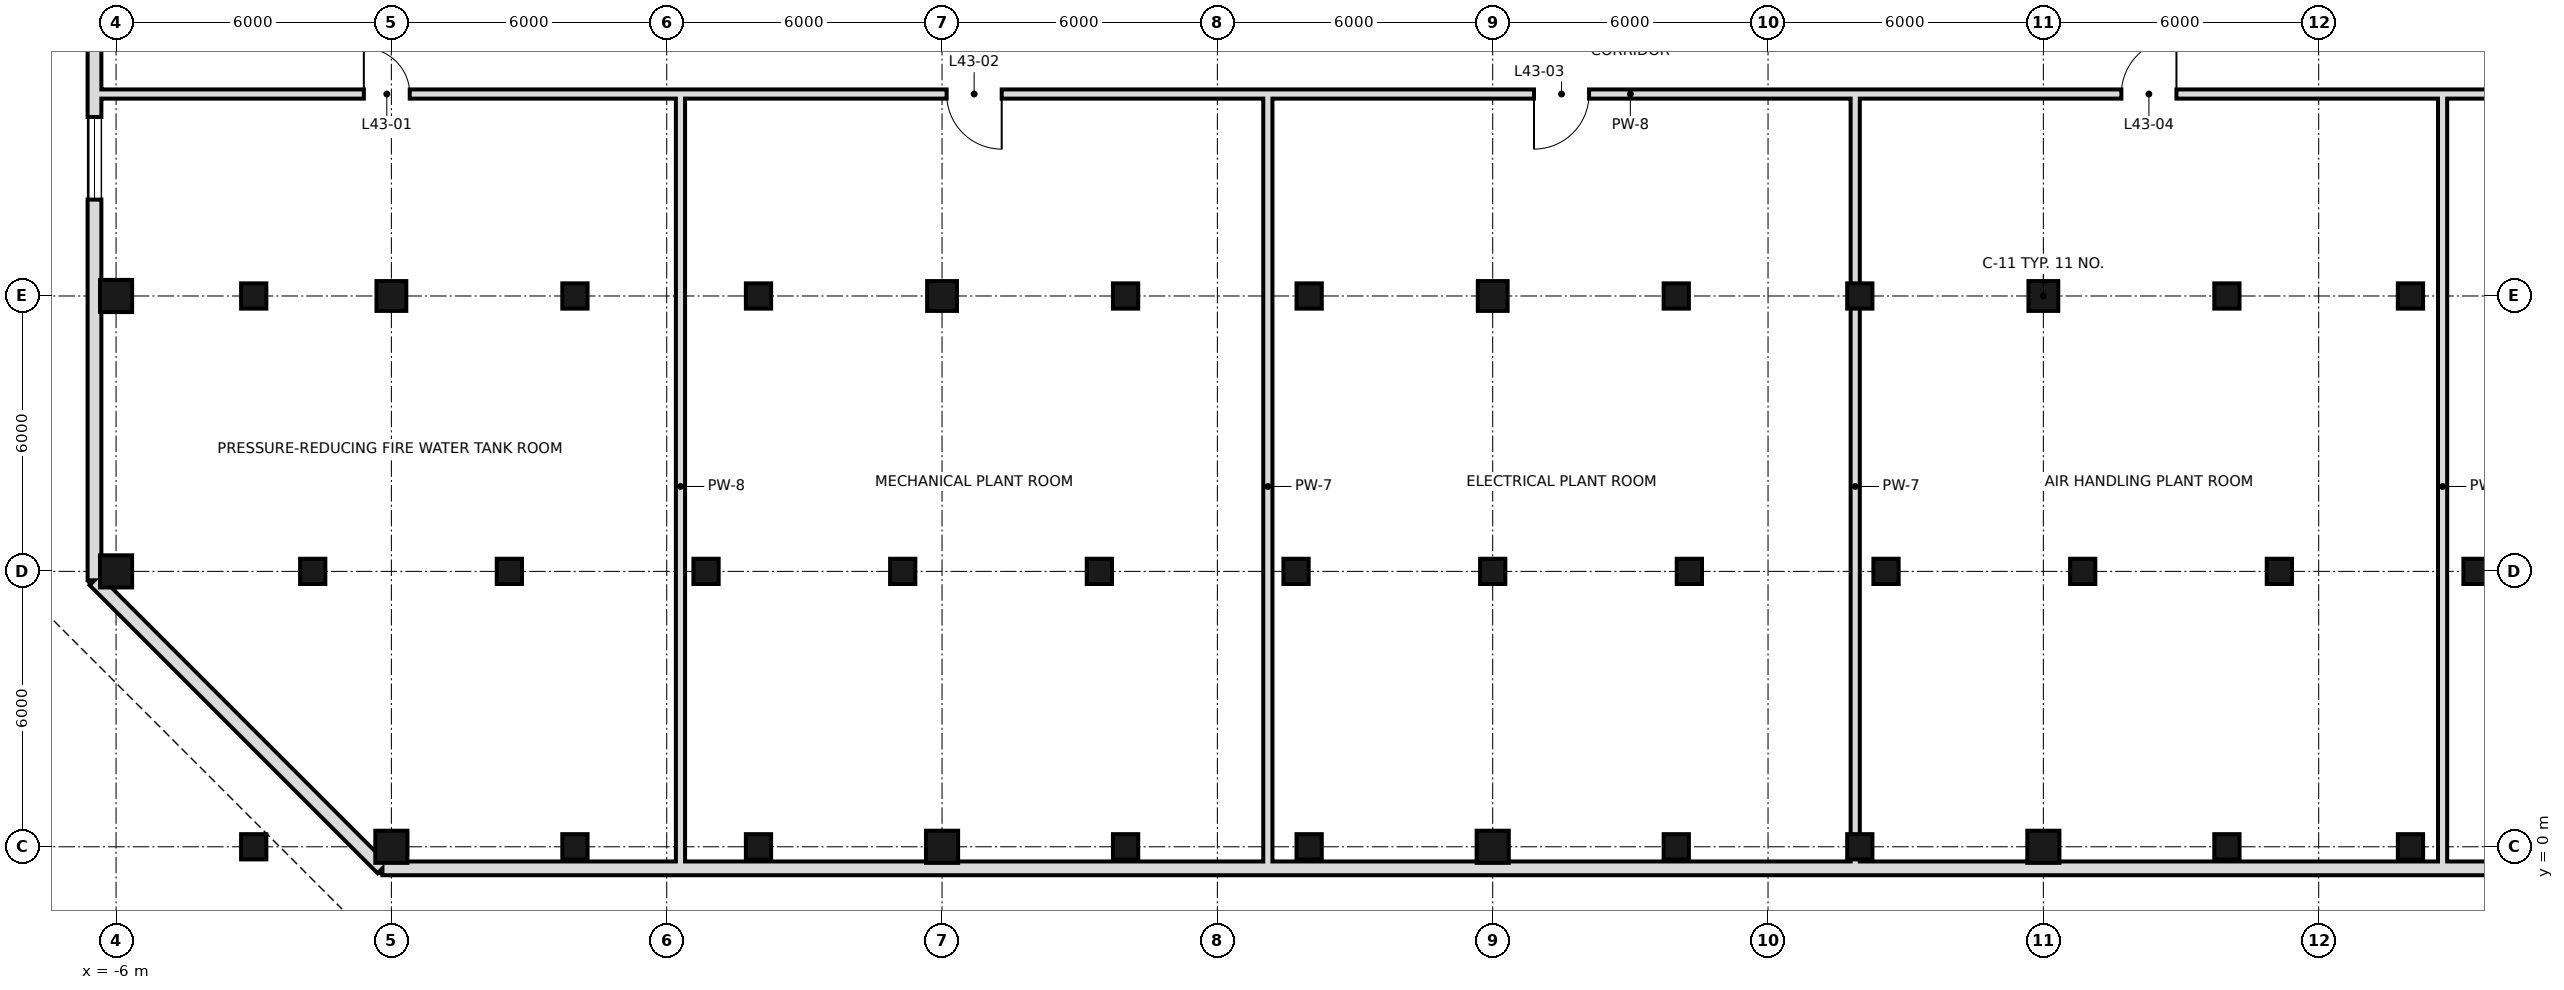
"""IFC4 building model, lengths in metres.
Left out: names, types, materials, properties, quantities, classifications, styles, units other than length and angle.
Written with IfcOpenShell. Run it as: python <this file> out.ifc"""

import sys

from ifc_helpers import new_model, si_unit, direction, frame, frame_2d, origin, origin_with_axes, origin_2d, place, context, subcontext, project, spatial, rectangle, hollow_rectangle, extrude, element, fill, save


model = new_model("IFC4")
c1 = context("Model", 3, precision=1e-05, world=origin(), true_north=direction((0.0, 1.0)))
c2 = subcontext(c1, "Body", "Model", "MODEL_VIEW")
j1 = project(units=[si_unit("LENGTHUNIT", "METRE"), si_unit("PLANEANGLEUNIT", "RADIAN")], contexts=[c1])
p1 = place(None, origin())
s1 = spatial("IfcSite", under=j1, at=p1, CompositionType="ELEMENT")
p2 = place(p1, origin())
s2 = spatial("IfcBuilding", under=s1, at=p2, CompositionType="ELEMENT")
p3 = place(p2, frame((0.0, 0.0, 186.0)))
s3 = spatial("IfcBuildingStorey", under=s2, at=p3, CompositionType="ELEMENT", Elevation=186.0)
p4 = place(p3, frame((-6.0, 6.0, 0.0), z_axis=(0.0, 0.0, 1.0), x_axis=(1.0, 0.0, 0.0)))
e1 = element("IfcColumn", 1, at=p4, inside=s3, PredefinedType="COLUMN", context=c2, shape_type="SweptSolid", body=[
    extrude(hollow_rectangle(XDim=0.7, YDim=0.7, WallThickness=0.036, at=origin_2d()), origin(), (0.0, 0.0, 1.0), 6.0),
])
p5 = place(p3, frame((-6.0, 12.0, 0.0), z_axis=(0.0, 0.0, 1.0), x_axis=(1.0, 0.0, 0.0)))
e2 = element("IfcColumn", 2, at=p5, inside=s3, PredefinedType="COLUMN", context=c2, shape_type="SweptSolid", body=[
    extrude(hollow_rectangle(XDim=0.7, YDim=0.7, WallThickness=0.036, at=origin_2d()), origin(), (0.0, 0.0, 1.0), 5.7),
])
p6 = place(p3, origin_with_axes())
e3 = element("IfcColumn", 3, at=p6, inside=s3, PredefinedType="COLUMN", context=c2, shape_type="SweptSolid", body=[
    extrude(hollow_rectangle(XDim=0.7, YDim=0.7, WallThickness=0.036, at=origin_2d()), origin(), (0.0, 0.0, 1.0), 6.0),
])
p7 = place(p3, frame((0.0, 12.0, 0.0), z_axis=(0.0, 0.0, 1.0), x_axis=(1.0, 0.0, 0.0)))
e4 = element("IfcColumn", 4, at=p7, inside=s3, PredefinedType="COLUMN", context=c2, shape_type="SweptSolid", body=[
    extrude(hollow_rectangle(XDim=0.65, YDim=0.65, WallThickness=0.032, at=origin_2d()), origin(), (0.0, 0.0, 1.0), 6.0),
])
p8 = place(p3, frame((12.0, 0.0, 0.0), z_axis=(0.0, 0.0, 1.0), x_axis=(1.0, 0.0, 0.0)))
e5 = element("IfcColumn", 5, at=p8, inside=s3, PredefinedType="COLUMN", context=c2, shape_type="SweptSolid", body=[
    extrude(hollow_rectangle(XDim=0.7, YDim=0.7, WallThickness=0.036, at=origin_2d()), origin(), (0.0, 0.0, 1.0), 6.0),
])
p9 = place(p3, frame((12.0, 12.0, 0.0), z_axis=(0.0, 0.0, 1.0), x_axis=(1.0, 0.0, 0.0)))
e6 = element("IfcColumn", 6, at=p9, inside=s3, PredefinedType="COLUMN", context=c2, shape_type="SweptSolid", body=[
    extrude(hollow_rectangle(XDim=0.65, YDim=0.65, WallThickness=0.032, at=origin_2d()), origin(), (0.0, 0.0, 1.0), 6.0),
])
p10 = place(p3, frame((24.0, 0.0, 0.0), z_axis=(0.0, 0.0, 1.0), x_axis=(1.0, 0.0, 0.0)))
e7 = element("IfcColumn", 7, at=p10, inside=s3, PredefinedType="COLUMN", context=c2, shape_type="SweptSolid", body=[
    extrude(hollow_rectangle(XDim=0.7, YDim=0.7, WallThickness=0.036, at=origin_2d()), origin(), (0.0, 0.0, 1.0), 6.0),
])
p11 = place(p3, frame((24.0, 12.0, 0.0), z_axis=(0.0, 0.0, 1.0), x_axis=(1.0, 0.0, 0.0)))
e8 = element("IfcColumn", 8, at=p11, inside=s3, PredefinedType="COLUMN", context=c2, shape_type="SweptSolid", body=[
    extrude(hollow_rectangle(XDim=0.65, YDim=0.65, WallThickness=0.032, at=origin_2d()), origin(), (0.0, 0.0, 1.0), 6.0),
])
p12 = place(p3, frame((36.0, 0.0, 0.0), z_axis=(0.0, 0.0, 1.0), x_axis=(1.0, 0.0, 0.0)))
e9 = element("IfcColumn", 9, at=p12, inside=s3, PredefinedType="COLUMN", context=c2, shape_type="SweptSolid", body=[
    extrude(hollow_rectangle(XDim=0.7, YDim=0.7, WallThickness=0.036, at=origin_2d()), origin(), (0.0, 0.0, 1.0), 6.0),
])
p13 = place(p3, frame((36.0, 12.0, 0.0), z_axis=(0.0, 0.0, 1.0), x_axis=(1.0, 0.0, 0.0)))
e10 = element("IfcColumn", 10, at=p13, inside=s3, PredefinedType="COLUMN", context=c2, shape_type="SweptSolid", body=[
    extrude(hollow_rectangle(XDim=0.65, YDim=0.65, WallThickness=0.032, at=origin_2d()), origin(), (0.0, 0.0, 1.0), 6.0),
])
for number, where, z_axis, x_axis in (
    (11, (-3.0, 0.0, 1.1), (0.0, 0.0, 1.0), (1.0, 0.0, 0.0)),
    (12, (4.0, 0.0, 1.1), (0.0, 0.0, 1.0), (1.0, 0.0, 0.0)),
    (13, (8.0, 0.0, 1.1), (0.0, 0.0, 1.0), (1.0, 0.0, 0.0)),
    (14, (16.0, 0.0, 1.1), (0.0, 0.0, 1.0), (1.0, 0.0, 0.0)),
    (15, (20.0, 0.0, 1.1), (0.0, 0.0, 1.0), (1.0, 0.0, 0.0)),
    (16, (28.0, 0.0, 1.1), (0.0, 0.0, 1.0), (1.0, 0.0, 0.0)),
    (17, (32.0, 0.0, 1.1), (0.0, 0.0, 1.0), (1.0, 0.0, 0.0)),
    (18, (40.0, 0.0, 1.1), (0.0, 0.0, 1.0), (1.0, 0.0, 0.0)),
    (19, (44.0, 0.0, 1.1), (0.0, 0.0, 1.0), (1.0, 0.0, 0.0)),
    (20, (-1.714, 6.0, 1.1), (0.0, 0.0, 1.0), (1.0, 0.0, 0.0)),
    (21, (2.572, 6.0, 1.1), (0.0, 0.0, 1.0), (1.0, 0.0, 0.0)),
    (22, (6.857, 6.0, 1.1), (0.0, 0.0, 1.0), (1.0, 0.0, 0.0)),
    (23, (11.143, 6.0, 1.1), (0.0, 0.0, 1.0), (1.0, 0.0, 0.0)),
    (24, (15.428, 6.0, 1.1), (0.0, 0.0, 1.0), (1.0, 0.0, 0.0)),
    (25, (19.714, 6.0, 1.1), (0.0, 0.0, 1.0), (1.0, 0.0, 0.0)),
    (26, (24.0, 6.0, 1.1), (0.0, 0.0, 1.0), (1.0, 0.0, 0.0)),
    (27, (28.286, 6.0, 1.1), (0.0, 0.0, 1.0), (1.0, 0.0, 0.0)),
    (28, (32.572, 6.0, 1.1), (0.0, 0.0, 1.0), (1.0, 0.0, 0.0)),
    (29, (36.857, 6.0, 1.1), (0.0, 0.0, 1.0), (1.0, 0.0, 0.0)),
    (30, (41.143, 6.0, 1.1), (0.0, 0.0, 1.0), (1.0, 0.0, 0.0)),
    (31, (45.428, 6.0, 1.1), (0.0, 0.0, 1.0), (1.0, 0.0, 0.0)),
    (32, (-3.0, 12.0, 1.1), (0.0, 0.0, 1.0), (1.0, 0.0, 0.0)),
    (33, (4.0, 12.0, 1.1), (0.0, 0.0, 1.0), (1.0, 0.0, 0.0)),
    (34, (8.0, 12.0, 1.1), (0.0, 0.0, 1.0), (1.0, 0.0, 0.0)),
    (35, (16.0, 12.0, 1.1), (0.0, 0.0, 1.0), (1.0, 0.0, 0.0)),
    (36, (20.0, 12.0, 1.1), (0.0, 0.0, 1.0), (1.0, 0.0, 0.0)),
    (37, (28.0, 12.0, 1.1), (0.0, 0.0, 1.0), (1.0, 0.0, 0.0)),
    (38, (32.0, 12.0, 1.1), (0.0, 0.0, 1.0), (1.0, 0.0, 0.0)),
    (39, (40.0, 12.0, 1.1), (0.0, 0.0, 1.0), (1.0, 0.0, 0.0)),
    (40, (44.0, 12.0, 1.1), (0.0, 0.0, 1.0), (1.0, 0.0, 0.0)),
):
    element("IfcColumn", number, at=place(p3, frame(where, z_axis=z_axis, x_axis=x_axis)), inside=s3, PredefinedType="COLUMN", context=c2, shape_type="SweptSolid", body=[
        extrude(hollow_rectangle(XDim=0.55, YDim=0.55, WallThickness=0.036, at=origin_2d()), origin(), (0.0, 0.0, 1.0), 3.5),
    ])
p14 = place(p3, frame((-0.195, -0.47, 0.0), z_axis=(0.0, 0.0, 1.0), x_axis=(1.0, 0.0, 0.0)))
e41 = element("IfcWall", 41, at=p14, inside=s3, PredefinedType="SOLIDWALL", context=c2, shape_type="SweptSolid", body=[
    extrude(rectangle(XDim=54.389, YDim=0.3, at=frame_2d((27.195, 0.0))), origin(), (0.0, 0.0, 1.0), 5.7),
])
p15 = place(p3, frame((-6.47, 42.195, 0.0), z_axis=(0.0, 0.0, 1.0), x_axis=(0.0, -1.0, 0.0)))
e42 = element("IfcWall", 42, at=p15, inside=s3, PredefinedType="SOLIDWALL", context=c2, shape_type="SweptSolid", body=[
    extrude(rectangle(XDim=36.389, YDim=0.3, at=frame_2d((18.195, 0.0))), origin(), (0.0, 0.0, 1.0), 5.7),
])
p16 = place(p15, frame((2.17, 0.0, 0.9)))
e43 = element("IfcOpeningElement", 43, at=p16, cuts=e42, PredefinedType="OPENING", context=c2, shape_type="SweptSolid", body=[
    extrude(rectangle(XDim=1.8, YDim=1.5, at=frame_2d((0.9, 0.75))), frame((0.0, 0.16, 0.0), z_axis=(0.0, -1.0, 0.0), x_axis=(1.0, 0.0, 0.0)), (0.0, 0.0, 1.0), 0.32),
])
p17 = place(p15, frame((14.295, 0.0, 0.9)))
e44 = element("IfcOpeningElement", 44, at=p17, cuts=e42, PredefinedType="OPENING", context=c2, shape_type="SweptSolid", body=[
    extrude(rectangle(XDim=1.8, YDim=1.5, at=frame_2d((0.9, 0.75))), frame((0.0, 0.16, 0.0), z_axis=(0.0, -1.0, 0.0), x_axis=(1.0, 0.0, 0.0)), (0.0, 0.0, 1.0), 0.32),
])
p18 = place(p15, frame((26.295, 0.0, 0.9)))
e45 = element("IfcOpeningElement", 45, at=p18, cuts=e42, PredefinedType="OPENING", context=c2, shape_type="SweptSolid", body=[
    extrude(rectangle(XDim=1.8, YDim=1.5, at=frame_2d((0.9, 0.75))), frame((0.0, 0.16, 0.0), z_axis=(0.0, -1.0, 0.0), x_axis=(1.0, 0.0, 0.0)), (0.0, 0.0, 1.0), 0.32),
])
p19 = place(p3, frame((-6.47, 5.805, 0.0), z_axis=(0.0, 0.0, 1.0), x_axis=(0.707106781187, -0.707106781187, 0.0)))
e46 = element("IfcWall", 46, at=p19, inside=s3, PredefinedType="SOLIDWALL", context=c2, shape_type="SweptSolid", body=[
    extrude(rectangle(XDim=8.875, YDim=0.3, at=frame_2d((4.438, 0.0))), origin(), (0.0, 0.0, 1.0), 5.7),
])
for number, where, z_axis, x_axis in (
    (47, (6.3, -0.6, 0.0), (0.0, 0.0, 1.0), (0.0, 1.0, 0.0)),
    (48, (19.1, -0.6, 0.0), (0.0, 0.0, 1.0), (0.0, 1.0, 0.0)),
    (49, (31.9, -0.6, 0.0), (0.0, 0.0, 1.0), (0.0, 1.0, 0.0)),
    (50, (44.7, -0.6, 0.0), (0.0, 0.0, 1.0), (0.0, 1.0, 0.0)),
):
    element("IfcWall", number, at=place(p3, frame(where, z_axis=z_axis, x_axis=x_axis)), inside=s3, PredefinedType="SOLIDWALL", context=c2, shape_type="SweptSolid", body=[
        extrude(rectangle(XDim=16.9, YDim=0.2, at=frame_2d((8.45, 0.0))), origin(), (0.0, 0.0, 1.0), 5.7),
    ])
p20 = place(p3, frame((-6.6, 16.4, 0.0), z_axis=(0.0, 0.0, 1.0), x_axis=(1.0, 0.0, 0.0)))
e51 = element("IfcWall", 51, at=p20, inside=s3, PredefinedType="SOLIDWALL", context=c2, shape_type="SweptSolid", body=[
    extrude(rectangle(XDim=67.2, YDim=0.2, at=frame_2d((33.6, 0.0))), origin(), (0.0, 0.0, 1.0), 5.0),
])
p21 = place(p20, frame((6.0, 0.0, 0.0)))
e52 = element("IfcOpeningElement", 52, at=p21, cuts=e51, PredefinedType="OPENING", context=c2, shape_type="SweptSolid", body=[
    extrude(rectangle(XDim=1.0, YDim=2.4, at=frame_2d((0.5, 1.2))), frame((0.0, 0.11, 0.0), z_axis=(0.0, -1.0, 0.0), x_axis=(1.0, 0.0, 0.0)), (0.0, 0.0, 1.0), 0.22),
])
p22 = place(p20, frame((18.7, 0.0, 0.0)))
e53 = element("IfcOpeningElement", 53, at=p22, cuts=e51, PredefinedType="OPENING", context=c2, shape_type="SweptSolid", body=[
    extrude(rectangle(XDim=1.2, YDim=2.4, at=frame_2d((0.6, 1.2))), frame((0.0, 0.11, 0.0), z_axis=(0.0, -1.0, 0.0), x_axis=(1.0, 0.0, 0.0)), (0.0, 0.0, 1.0), 0.22),
])
p23 = place(p20, frame((31.5, 0.0, 0.0)))
e54 = element("IfcOpeningElement", 54, at=p23, cuts=e51, PredefinedType="OPENING", context=c2, shape_type="SweptSolid", body=[
    extrude(rectangle(XDim=1.2, YDim=2.4, at=frame_2d((0.6, 1.2))), frame((0.0, 0.11, 0.0), z_axis=(0.0, -1.0, 0.0), x_axis=(1.0, 0.0, 0.0)), (0.0, 0.0, 1.0), 0.22),
])
p24 = place(p20, frame((44.3, 0.0, 0.0)))
e55 = element("IfcOpeningElement", 55, at=p24, cuts=e51, PredefinedType="OPENING", context=c2, shape_type="SweptSolid", body=[
    extrude(rectangle(XDim=1.2, YDim=2.4, at=frame_2d((0.6, 1.2))), frame((0.0, 0.11, 0.0), z_axis=(0.0, -1.0, 0.0), x_axis=(1.0, 0.0, 0.0)), (0.0, 0.0, 1.0), 0.22),
])
p25 = place(p20, frame((57.1, 0.0, 0.0)))
e56 = element("IfcOpeningElement", 56, at=p25, cuts=e51, PredefinedType="OPENING", context=c2, shape_type="SweptSolid", body=[
    extrude(rectangle(XDim=1.2, YDim=2.4, at=frame_2d((0.6, 1.2))), frame((0.0, 0.11, 0.0), z_axis=(0.0, -1.0, 0.0), x_axis=(1.0, 0.0, 0.0)), (0.0, 0.0, 1.0), 0.22),
])
p26 = place(p20, frame((65.1, 0.0, 0.0)))
e57 = element("IfcOpeningElement", 57, at=p26, cuts=e51, PredefinedType="OPENING", context=c2, shape_type="SweptSolid", body=[
    extrude(rectangle(XDim=1.0, YDim=2.4, at=frame_2d((0.5, 1.2))), frame((0.0, 0.11, 0.0), z_axis=(0.0, -1.0, 0.0), x_axis=(1.0, 0.0, 0.0)), (0.0, 0.0, 1.0), 0.22),
])
p27 = place(p18, origin())
e58 = element("IfcWindow", 58, at=p27, inside=s3, PartitioningType="SINGLE_PANEL", PredefinedType="WINDOW", context=c2, shape_type="SweptSolid", body=[
    extrude(rectangle(XDim=1.8, YDim=1.5, at=frame_2d((0.9, 0.75))), frame((0.0, 0.03, 0.0), z_axis=(0.0, -1.0, 0.0), x_axis=(1.0, 0.0, 0.0)), (0.0, 0.0, 1.0), 0.06),
])
fill(e45, e58)
p28 = place(p21, origin())
e59 = element("IfcDoor", 59, at=p28, inside=s3, OperationType="SINGLE_SWING_LEFT", PredefinedType="DOOR", context=c2, shape_type="SweptSolid", body=[
    extrude(rectangle(XDim=1.0, YDim=2.4, at=frame_2d((0.5, 1.2))), frame((0.0, 0.025, 0.0), z_axis=(0.0, -1.0, 0.0), x_axis=(1.0, 0.0, 0.0)), (0.0, 0.0, 1.0), 0.05),
])
fill(e52, e59)
p29 = place(p22, origin())
e60 = element("IfcDoor", 60, at=p29, inside=s3, OperationType="SINGLE_SWING_RIGHT", PredefinedType="DOOR", context=c2, shape_type="SweptSolid", body=[
    extrude(rectangle(XDim=1.2, YDim=2.4, at=frame_2d((0.6, 1.2))), frame((0.0, 0.025, 0.0), z_axis=(0.0, -1.0, 0.0), x_axis=(1.0, 0.0, 0.0)), (0.0, 0.0, 1.0), 0.05),
])
fill(e53, e60)
p30 = place(p23, frame((1.2, 0.0, 0.0), z_axis=(0.0, 0.0, 1.0), x_axis=(-1.0, 0.0, 0.0)))
e61 = element("IfcDoor", 61, at=p30, inside=s3, OperationType="SINGLE_SWING_RIGHT", PredefinedType="DOOR", context=c2, shape_type="SweptSolid", body=[
    extrude(rectangle(XDim=1.2, YDim=2.4, at=frame_2d((0.6, 1.2))), frame((0.0, 0.025, 0.0), z_axis=(0.0, -1.0, 0.0), x_axis=(1.0, 0.0, 0.0)), (0.0, 0.0, 1.0), 0.05),
])
fill(e54, e61)
p31 = place(p24, frame((1.2, 0.0, 0.0), z_axis=(0.0, 0.0, 1.0), x_axis=(-1.0, 0.0, 0.0)))
e62 = element("IfcDoor", 62, at=p31, inside=s3, OperationType="SINGLE_SWING_LEFT", PredefinedType="DOOR", context=c2, shape_type="SweptSolid", body=[
    extrude(rectangle(XDim=1.2, YDim=2.4, at=frame_2d((0.6, 1.2))), frame((0.0, 0.025, 0.0), z_axis=(0.0, -1.0, 0.0), x_axis=(1.0, 0.0, 0.0)), (0.0, 0.0, 1.0), 0.05),
])
fill(e55, e62)
save(model, sys.argv[1])
